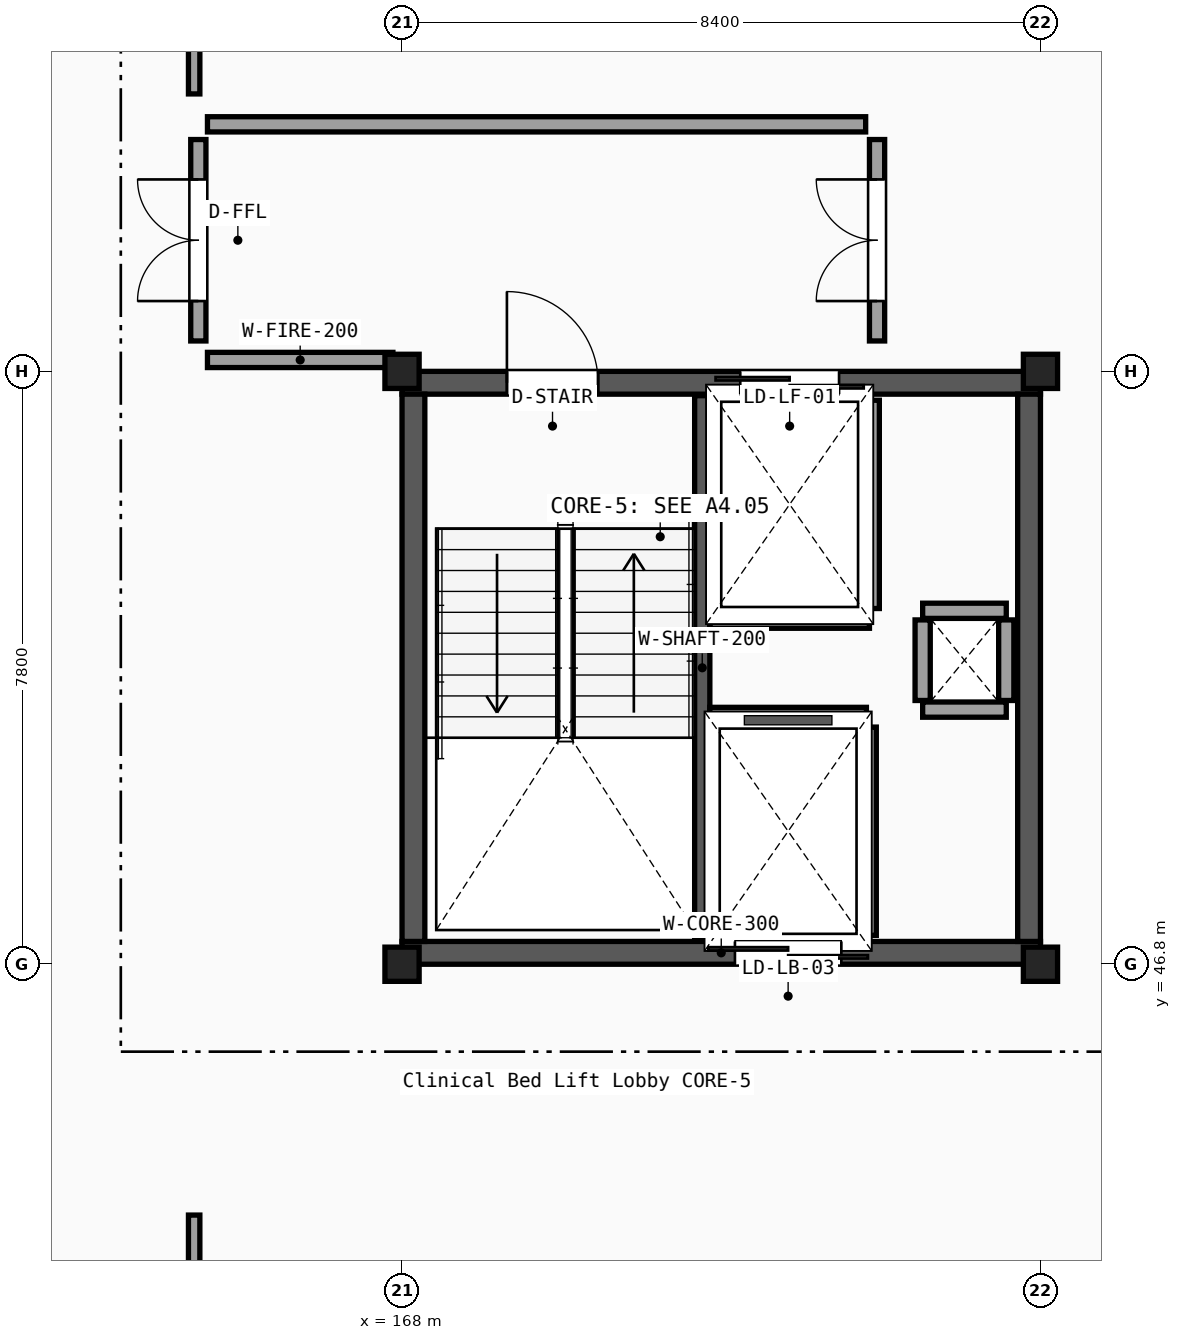
"""IFC4 building model, lengths in metres.
Left out: names, types, materials, properties, quantities, classifications, styles, units other than length and angle.
Written with IfcOpenShell. Run it as: python <this file> out.ifc"""

import sys

from ifc_helpers import new_model, si_unit, direction, frame, frame_2d, origin, origin_2d, place, context, subcontext, project, spatial, rectangle, i_section, extrude, element, fill, save


model = new_model("IFC4")
c1 = context("Model", 3, precision=1e-05, world=origin(), true_north=direction((0.0, 1.0)))
c2 = subcontext(c1, "Body", "Model", "MODEL_VIEW")
j1 = project(units=[si_unit("LENGTHUNIT", "METRE"), si_unit("PLANEANGLEUNIT", "RADIAN")], contexts=[c1])
p1 = place(None, origin())
s1 = spatial("IfcSite", under=j1, at=p1, CompositionType="ELEMENT")
p2 = place(p1, origin())
s2 = spatial("IfcBuilding", under=s1, at=p2, CompositionType="ELEMENT")
p3 = place(p2, frame((0.0, 0.0, 22.95)))
s3 = spatial("IfcBuildingStorey", under=s2, at=p3, CompositionType="ELEMENT", Elevation=22.95)
for number, where, z_axis, x_axis in (
    (1, (168.0, 46.8, 0.0), (0.0, 0.0, 1.0), (1.0, 0.0, 0.0)),
    (2, (168.0, 54.6, 0.0), (0.0, 0.0, 1.0), (1.0, 0.0, 0.0)),
    (3, (176.4, 46.8, 0.0), (0.0, 0.0, 1.0), (1.0, 0.0, 0.0)),
    (4, (176.4, 54.6, 0.0), (0.0, 0.0, 1.0), (1.0, 0.0, 0.0)),
):
    element("IfcColumn", number, at=place(p3, frame(where, z_axis=z_axis, x_axis=x_axis)), inside=s3, PredefinedType="COLUMN", context=c2, shape_type="SweptSolid", body=[
        extrude(i_section(OverallWidth=0.3, OverallDepth=0.45, WebThickness=0.014, FlangeThickness=0.026, FilletRadius=0.027, at=origin_2d()), origin(), (0.0, 0.0, 1.0), 4.05),
    ])
p4 = place(p3, frame((168.0, 46.95, 0.0), z_axis=(0.0, 0.0, 1.0), x_axis=(1.0, 0.0, 0.0)))
e5 = element("IfcWall", 5, at=p4, inside=s3, PredefinedType="SHEAR", context=c2, shape_type="SweptSolid", body=[
    extrude(rectangle(XDim=8.4, YDim=0.3, at=frame_2d((4.2, 0.0))), origin(), (0.0, 0.0, 1.0), 3.82),
])
p5 = place(p4, frame((4.38, 0.0, 0.0)))
e6 = element("IfcOpeningElement", 6, at=p5, cuts=e5, PredefinedType="OPENING", context=c2, shape_type="SweptSolid", body=[
    extrude(rectangle(XDim=1.4, YDim=2.2, at=frame_2d((0.7, 1.1))), frame((0.0, 0.16, 0.0), z_axis=(0.0, -1.0, 0.0), x_axis=(1.0, 0.0, 0.0)), (0.0, 0.0, 1.0), 0.32),
])
p6 = place(p3, frame((168.0, 54.45, 0.0), z_axis=(0.0, 0.0, 1.0), x_axis=(1.0, 0.0, 0.0)))
e7 = element("IfcWall", 7, at=p6, inside=s3, PredefinedType="SHEAR", context=c2, shape_type="SweptSolid", body=[
    extrude(rectangle(XDim=8.4, YDim=0.3, at=frame_2d((4.2, 0.0))), origin(), (0.0, 0.0, 1.0), 3.82),
])
p7 = place(p6, frame((1.38, 0.0, 0.0)))
e8 = element("IfcOpeningElement", 8, at=p7, cuts=e7, PredefinedType="OPENING", context=c2, shape_type="SweptSolid", body=[
    extrude(rectangle(XDim=1.2, YDim=2.15, at=frame_2d((0.6, 1.075))), frame((0.0, 0.16, 0.0), z_axis=(0.0, -1.0, 0.0), x_axis=(1.0, 0.0, 0.0)), (0.0, 0.0, 1.0), 0.32),
])
p8 = place(p6, frame((4.45, 0.0, 0.0)))
e9 = element("IfcOpeningElement", 9, at=p8, cuts=e7, PredefinedType="OPENING", context=c2, shape_type="SweptSolid", body=[
    extrude(rectangle(XDim=1.3, YDim=2.2, at=frame_2d((0.65, 1.1))), frame((0.0, 0.16, 0.0), z_axis=(0.0, -1.0, 0.0), x_axis=(1.0, 0.0, 0.0)), (0.0, 0.0, 1.0), 0.32),
])
for number, where, z_axis, x_axis in (
    (10, (168.15, 47.1, 0.0), (0.0, 0.0, 1.0), (0.0, 1.0, 0.0)),
    (11, (176.25, 47.1, 0.0), (0.0, 0.0, 1.0), (0.0, 1.0, 0.0)),
):
    element("IfcWall", number, at=place(p3, frame(where, z_axis=z_axis, x_axis=x_axis)), inside=s3, PredefinedType="SHEAR", context=c2, shape_type="SweptSolid", body=[
        extrude(rectangle(XDim=7.2, YDim=0.3, at=frame_2d((3.6, 0.0))), origin(), (0.0, 0.0, 1.0), 3.82),
    ])
p9 = place(p3, frame((171.95, 47.12, 0.0), z_axis=(0.0, 0.0, 1.0), x_axis=(0.0, 1.0, 0.0)))
e12 = element("IfcWall", 12, at=p9, inside=s3, PredefinedType="SHEAR", context=c2, shape_type="SweptSolid", body=[
    extrude(rectangle(XDim=7.16, YDim=0.2, at=frame_2d((3.58, 0.0))), origin(), (0.0, 0.0, 1.0), 3.82),
])
for number, where, z_axis, x_axis in (
    (13, (174.85, 50.15, 0.0), (0.0, 0.0, 1.0), (1.0, 0.0, 0.0)),
    (14, (174.85, 51.45, 0.0), (0.0, 0.0, 1.0), (1.0, 0.0, 0.0)),
):
    element("IfcWall", number, at=place(p3, frame(where, z_axis=z_axis, x_axis=x_axis)), inside=s3, PredefinedType="PARTITIONING", context=c2, shape_type="SweptSolid", body=[
        extrude(rectangle(XDim=1.1, YDim=0.2, at=frame_2d((0.55, 0.0))), origin(), (0.0, 0.0, 1.0), 3.25),
    ])
for number, where, z_axis, x_axis in (
    (15, (174.85, 50.27, 0.0), (0.0, 0.0, 1.0), (0.0, 1.0, 0.0)),
    (16, (175.95, 50.27, 0.0), (0.0, 0.0, 1.0), (0.0, 1.0, 0.0)),
):
    element("IfcWall", number, at=place(p3, frame(where, z_axis=z_axis, x_axis=x_axis)), inside=s3, PredefinedType="PARTITIONING", context=c2, shape_type="SweptSolid", body=[
        extrude(rectangle(XDim=1.06, YDim=0.2, at=frame_2d((0.53, 0.0))), origin(), (0.0, 0.0, 1.0), 3.25),
    ])
p10 = place(p3, frame((174.18, 51.48, 0.0), z_axis=(0.0, 0.0, 1.0), x_axis=(0.0, 1.0, 0.0)))
e17 = element("IfcWall", 17, at=p10, inside=s3, PredefinedType="PARTITIONING", context=c2, shape_type="SweptSolid", body=[
    extrude(rectangle(XDim=2.74, YDim=0.2, at=frame_2d((1.37, 0.0))), origin(), (0.0, 0.0, 1.0), 3.25),
])
p11 = place(p3, frame((172.05, 51.32, 0.0), z_axis=(0.0, 0.0, 1.0), x_axis=(1.0, 0.0, 0.0)))
e18 = element("IfcWall", 18, at=p11, inside=s3, PredefinedType="PARTITIONING", context=c2, shape_type="SweptSolid", body=[
    extrude(rectangle(XDim=2.1, YDim=0.2, at=frame_2d((1.05, 0.0))), origin(), (0.0, 0.0, 1.0), 3.25),
])
p12 = place(p3, frame((174.14, 47.18, 0.0), z_axis=(0.0, 0.0, 1.0), x_axis=(0.0, 1.0, 0.0)))
e19 = element("IfcWall", 19, at=p12, inside=s3, PredefinedType="PARTITIONING", context=c2, shape_type="SweptSolid", body=[
    extrude(rectangle(XDim=2.74, YDim=0.2, at=frame_2d((1.37, 0.0))), origin(), (0.0, 0.0, 1.0), 3.25),
])
p13 = place(p3, frame((172.05, 50.08, 0.0), z_axis=(0.0, 0.0, 1.0), x_axis=(1.0, 0.0, 0.0)))
e20 = element("IfcWall", 20, at=p13, inside=s3, PredefinedType="PARTITIONING", context=c2, shape_type="SweptSolid", body=[
    extrude(rectangle(XDim=2.06, YDim=0.2, at=frame_2d((1.03, 0.0))), origin(), (0.0, 0.0, 1.0), 3.25),
])
p14 = place(p3, frame((165.44, 54.75, 0.0), z_axis=(0.0, 0.0, 1.0), x_axis=(1.0, 0.0, 0.0)))
e21 = element("IfcWall", 21, at=p14, inside=s3, PredefinedType="PARTITIONING", context=c2, shape_type="SweptSolid", body=[
    extrude(rectangle(XDim=2.44, YDim=0.2, at=frame_2d((1.22, 0.0))), origin(), (0.0, 0.0, 1.0), 3.25),
])
p15 = place(p3, frame((165.44, 57.85, 0.0), z_axis=(0.0, 0.0, 1.0), x_axis=(1.0, 0.0, 0.0)))
e22 = element("IfcWall", 22, at=p15, inside=s3, PredefinedType="PARTITIONING", context=c2, shape_type="SweptSolid", body=[
    extrude(rectangle(XDim=8.66, YDim=0.2, at=frame_2d((4.33, 0.0))), origin(), (0.0, 0.0, 1.0), 3.25),
])
p16 = place(p3, frame((165.32, 55.0, 0.0), z_axis=(0.0, 0.0, 1.0), x_axis=(0.0, 1.0, 0.0)))
e23 = element("IfcWall", 23, at=p16, inside=s3, PredefinedType="PARTITIONING", context=c2, shape_type="SweptSolid", body=[
    extrude(rectangle(XDim=2.65, YDim=0.2, at=frame_2d((1.325, 0.0))), origin(), (0.0, 0.0, 1.0), 3.25),
])
p17 = place(p16, frame((0.525, 0.0, 0.0)))
e24 = element("IfcOpeningElement", 24, at=p17, cuts=e23, PredefinedType="OPENING", context=c2, shape_type="SweptSolid", body=[
    extrude(rectangle(XDim=1.6, YDim=2.2, at=frame_2d((0.8, 1.1))), frame((0.0, 0.11, 0.0), z_axis=(0.0, -1.0, 0.0), x_axis=(1.0, 0.0, 0.0)), (0.0, 0.0, 1.0), 0.22),
])
p18 = place(p3, frame((174.25, 55.0, 0.0), z_axis=(0.0, 0.0, 1.0), x_axis=(0.0, 1.0, 0.0)))
e25 = element("IfcWall", 25, at=p18, inside=s3, PredefinedType="PARTITIONING", context=c2, shape_type="SweptSolid", body=[
    extrude(rectangle(XDim=2.65, YDim=0.2, at=frame_2d((1.325, 0.0))), origin(), (0.0, 0.0, 1.0), 3.25),
])
p19 = place(p18, frame((0.525, 0.0, 0.0)))
e26 = element("IfcOpeningElement", 26, at=p19, cuts=e25, PredefinedType="OPENING", context=c2, shape_type="SweptSolid", body=[
    extrude(rectangle(XDim=1.6, YDim=2.2, at=frame_2d((0.8, 1.1))), frame((0.0, 0.11, 0.0), z_axis=(0.0, -1.0, 0.0), x_axis=(1.0, 0.0, 0.0)), (0.0, 0.0, 1.0), 0.22),
])
p20 = place(p3, frame((165.265, 39.62, 0.0), z_axis=(0.0, 0.0, 1.0), x_axis=(0.0, 1.0, 0.0)))
e27 = element("IfcWall", 27, at=p20, inside=s3, PredefinedType="PARTITIONING", context=c2, shape_type="SweptSolid", body=[
    extrude(rectangle(XDim=3.88, YDim=0.15, at=frame_2d((1.94, 0.0))), origin(), (0.0, 0.0, 1.0), 3.77),
])
p21 = place(p20, frame((1.415, 0.0, 0.0)))
e28 = element("IfcOpeningElement", 28, at=p21, cuts=e27, PredefinedType="OPENING", context=c2, shape_type="SweptSolid", body=[
    extrude(rectangle(XDim=1.05, YDim=2.15, at=frame_2d((0.525, 1.075))), frame((0.0, 0.085, 0.0), z_axis=(0.0, -1.0, 0.0), x_axis=(1.0, 0.0, 0.0)), (0.0, 0.0, 1.0), 0.17),
])
p22 = place(p3, frame((165.265, 58.25, 0.0), z_axis=(0.0, 0.0, 1.0), x_axis=(0.0, 1.0, 0.0)))
e29 = element("IfcWall", 29, at=p22, inside=s3, PredefinedType="PARTITIONING", context=c2, shape_type="SweptSolid", body=[
    extrude(rectangle(XDim=8.65, YDim=0.15, at=frame_2d((4.325, 0.0))), origin(), (0.0, 0.0, 1.0), 3.25),
])
p23 = place(p22, frame((3.8, 0.0, 0.0)))
e30 = element("IfcOpeningElement", 30, at=p23, cuts=e29, PredefinedType="OPENING", context=c2, shape_type="SweptSolid", body=[
    extrude(rectangle(XDim=1.05, YDim=2.15, at=frame_2d((0.525, 1.075))), frame((0.0, 0.085, 0.0), z_axis=(0.0, -1.0, 0.0), x_axis=(1.0, 0.0, 0.0)), (0.0, 0.0, 1.0), 0.17),
])
p24 = place(p7, origin())
e31 = element("IfcDoor", 31, at=p24, inside=s3, OperationType="SINGLE_SWING_LEFT", PredefinedType="DOOR", context=c2, shape_type="SweptSolid", body=[
    extrude(rectangle(XDim=1.2, YDim=2.15, at=frame_2d((0.6, 1.075))), frame((0.0, 0.025, 0.0), z_axis=(0.0, -1.0, 0.0), x_axis=(1.0, 0.0, 0.0)), (0.0, 0.0, 1.0), 0.05),
])
fill(e8, e31)
p25 = place(p8, origin())
e32 = element("IfcDoor", 32, at=p25, inside=s3, OperationType="DOUBLE_DOOR_SLIDING", PredefinedType="DOOR", context=c2, shape_type="SweptSolid", body=[
    extrude(rectangle(XDim=1.3, YDim=2.2, at=frame_2d((0.65, 1.1))), frame((0.0, 0.025, 0.0), z_axis=(0.0, -1.0, 0.0), x_axis=(1.0, 0.0, 0.0)), (0.0, 0.0, 1.0), 0.05),
])
fill(e9, e32)
p26 = place(p5, origin())
e33 = element("IfcDoor", 33, at=p26, inside=s3, OperationType="DOUBLE_DOOR_SLIDING", PredefinedType="DOOR", context=c2, shape_type="SweptSolid", body=[
    extrude(rectangle(XDim=1.4, YDim=2.2, at=frame_2d((0.7, 1.1))), frame((0.0, 0.025, 0.0), z_axis=(0.0, -1.0, 0.0), x_axis=(1.0, 0.0, 0.0)), (0.0, 0.0, 1.0), 0.05),
])
fill(e6, e33)
p27 = place(p17, origin())
e34 = element("IfcDoor", 34, at=p27, inside=s3, OperationType="DOUBLE_DOOR_SINGLE_SWING", PredefinedType="DOOR", context=c2, shape_type="SweptSolid", body=[
    extrude(rectangle(XDim=1.6, YDim=2.2, at=frame_2d((0.8, 1.1))), frame((0.0, 0.025, 0.0), z_axis=(0.0, -1.0, 0.0), x_axis=(1.0, 0.0, 0.0)), (0.0, 0.0, 1.0), 0.05),
])
fill(e24, e34)
p28 = place(p19, origin())
e35 = element("IfcDoor", 35, at=p28, inside=s3, OperationType="DOUBLE_DOOR_SINGLE_SWING", PredefinedType="DOOR", context=c2, shape_type="SweptSolid", body=[
    extrude(rectangle(XDim=1.6, YDim=2.2, at=frame_2d((0.8, 1.1))), frame((0.0, 0.025, 0.0), z_axis=(0.0, -1.0, 0.0), x_axis=(1.0, 0.0, 0.0)), (0.0, 0.0, 1.0), 0.05),
])
fill(e26, e35)
save(model, sys.argv[1])
